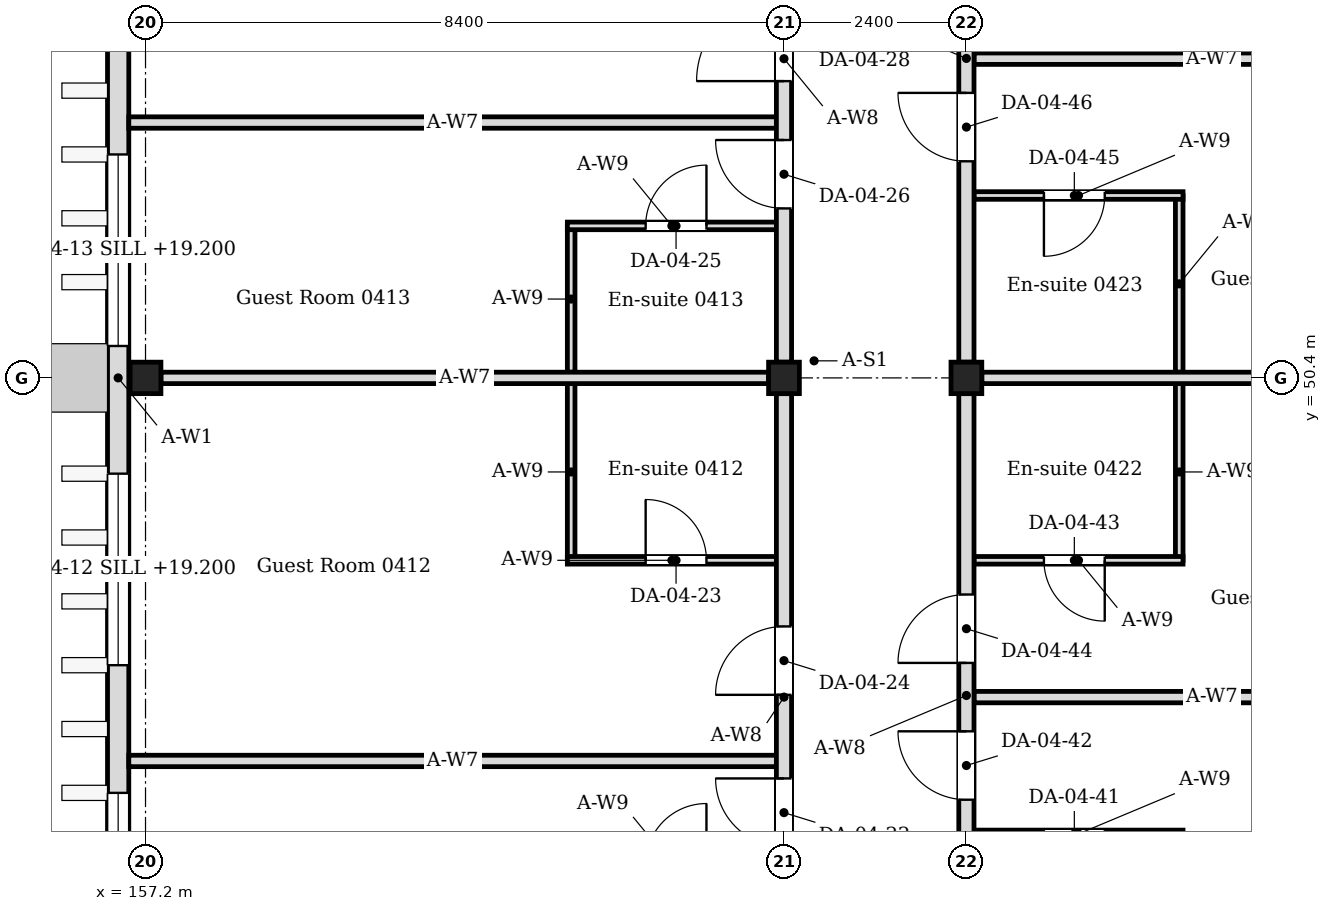
"""IFC4 building model, lengths in metres.
Left out: names, types, materials, properties, quantities, classifications, styles, units other than length and angle.
Written with IfcOpenShell. Run it as: python <this file> out.ifc"""

import sys

from ifc_helpers import new_model, si_unit, direction, frame, frame_2d, origin, origin_2d, place, context, subcontext, project, spatial, rectangle, i_section, extrude, element, fill, save


model = new_model("IFC4")
c1 = context("Model", 3, precision=1e-05, world=origin(), true_north=direction((0.0, 1.0)))
c2 = subcontext(c1, "Body", "Model", "MODEL_VIEW")
j1 = project(units=[si_unit("LENGTHUNIT", "METRE"), si_unit("PLANEANGLEUNIT", "RADIAN")], contexts=[c1])
p1 = place(None, origin())
s1 = spatial("IfcSite", under=j1, at=p1, CompositionType="ELEMENT")
p2 = place(p1, origin())
s2 = spatial("IfcBuilding", under=s1, at=p2, CompositionType="ELEMENT")
p3 = place(p2, frame((0.0, 0.0, 18.6)))
s3 = spatial("IfcBuildingStorey", under=s2, at=p3, CompositionType="ELEMENT", Elevation=18.6)
for number, where, z_axis, x_axis in (
    (1, (157.2, 50.4, 0.0), (0.0, 0.0, 1.0), (1.0, 0.0, 0.0)),
    (2, (165.6, 50.4, 0.0), (0.0, 0.0, 1.0), (1.0, 0.0, 0.0)),
    (3, (168.0, 50.4, 0.0), (0.0, 0.0, 1.0), (1.0, 0.0, 0.0)),
):
    element("IfcColumn", number, at=place(p3, frame(where, z_axis=z_axis, x_axis=x_axis)), inside=s3, PredefinedType="COLUMN", context=c2, shape_type="SweptSolid", body=[
        extrude(i_section(OverallWidth=0.405, OverallDepth=0.414, WebThickness=0.018, FlangeThickness=0.028, FilletRadius=0.022, at=origin_2d()), origin(), (0.0, 0.0, 1.0), 4.2),
    ])
p4 = place(p3, frame((156.84, 41.65, 0.0), z_axis=(0.0, 0.0, 1.0), x_axis=(0.0, 1.0, 0.0)))
e4 = element("IfcWall", 4, at=p4, inside=s3, PredefinedType="SOLIDWALL", context=c2, shape_type="SweptSolid", body=[
    extrude(rectangle(XDim=17.5, YDim=0.28, at=frame_2d((8.75, 0.0))), origin(), (0.0, 0.0, 1.0), 4.05),
])
p5 = place(p4, frame((0.77, 0.0, 0.6)))
e5 = element("IfcOpeningElement", 5, at=p5, cuts=e4, PredefinedType="OPENING", context=c2, shape_type="SweptSolid", body=[
    extrude(rectangle(XDim=2.52, YDim=2.4, at=frame_2d((1.26, 1.2))), frame((0.0, 0.15, 0.0), z_axis=(0.0, -1.0, 0.0), x_axis=(1.0, 0.0, 0.0)), (0.0, 0.0, 1.0), 0.3),
])
p6 = place(p4, frame((4.97, 0.0, 0.6)))
e6 = element("IfcOpeningElement", 6, at=p6, cuts=e4, PredefinedType="OPENING", context=c2, shape_type="SweptSolid", body=[
    extrude(rectangle(XDim=2.52, YDim=2.4, at=frame_2d((1.26, 1.2))), frame((0.0, 0.15, 0.0), z_axis=(0.0, -1.0, 0.0), x_axis=(1.0, 0.0, 0.0)), (0.0, 0.0, 1.0), 0.3),
])
p7 = place(p4, frame((9.17, 0.0, 0.6)))
e7 = element("IfcOpeningElement", 7, at=p7, cuts=e4, PredefinedType="OPENING", context=c2, shape_type="SweptSolid", body=[
    extrude(rectangle(XDim=2.52, YDim=2.4, at=frame_2d((1.26, 1.2))), frame((0.0, 0.15, 0.0), z_axis=(0.0, -1.0, 0.0), x_axis=(1.0, 0.0, 0.0)), (0.0, 0.0, 1.0), 0.3),
])
p8 = place(p4, frame((13.37, 0.0, 0.45)))
e8 = element("IfcOpeningElement", 8, at=p8, cuts=e4, PredefinedType="OPENING", context=c2, shape_type="SweptSolid", body=[
    extrude(rectangle(XDim=2.52, YDim=2.1, at=frame_2d((1.26, 1.05))), frame((0.0, 0.15, 0.0), z_axis=(0.0, -1.0, 0.0), x_axis=(1.0, 0.0, 0.0)), (0.0, 0.0, 1.0), 0.3),
])
p9 = place(p3, frame((162.8, 48.0, 0.0), z_axis=(0.0, 0.0, 1.0), x_axis=(0.0, 1.0, 0.0)))
e9 = element("IfcWall", 9, at=p9, inside=s3, PredefinedType="PARTITIONING", context=c2, shape_type="SweptSolid", body=[
    extrude(rectangle(XDim=2.325, YDim=0.1, at=frame_2d((1.163, 0.0))), origin(), (0.0, 0.0, 1.0), 4.05),
])
p10 = place(p3, frame((162.75, 48.0, 0.0), z_axis=(0.0, 0.0, 1.0), x_axis=(1.0, 0.0, 0.0)))
e10 = element("IfcWall", 10, at=p10, inside=s3, PredefinedType="PARTITIONING", context=c2, shape_type="SweptSolid", body=[
    extrude(rectangle(XDim=2.75, YDim=0.1, at=frame_2d((1.375, 0.0))), origin(), (0.0, 0.0, 1.0), 4.05),
])
p11 = place(p10, frame((1.03, 0.0, 0.0)))
e11 = element("IfcOpeningElement", 11, at=p11, cuts=e10, PredefinedType="OPENING", context=c2, shape_type="SweptSolid", body=[
    extrude(rectangle(XDim=0.8, YDim=2.1, at=frame_2d((0.4, 1.05))), frame((0.0, 0.06, 0.0), z_axis=(0.0, -1.0, 0.0), x_axis=(1.0, 0.0, 0.0)), (0.0, 0.0, 1.0), 0.12),
])
p12 = place(p3, frame((162.8, 50.475, 0.0), z_axis=(0.0, 0.0, 1.0), x_axis=(0.0, 1.0, 0.0)))
e12 = element("IfcWall", 12, at=p12, inside=s3, PredefinedType="PARTITIONING", context=c2, shape_type="SweptSolid", body=[
    extrude(rectangle(XDim=1.925, YDim=0.1, at=frame_2d((0.962, 0.0))), origin(), (0.0, 0.0, 1.0), 4.05),
])
p13 = place(p3, frame((162.75, 52.4, 0.0), z_axis=(0.0, 0.0, 1.0), x_axis=(1.0, 0.0, 0.0)))
e13 = element("IfcWall", 13, at=p13, inside=s3, PredefinedType="PARTITIONING", context=c2, shape_type="SweptSolid", body=[
    extrude(rectangle(XDim=2.75, YDim=0.1, at=frame_2d((1.375, 0.0))), origin(), (0.0, 0.0, 1.0), 4.05),
])
p14 = place(p13, frame((1.03, 0.0, 0.0)))
e14 = element("IfcOpeningElement", 14, at=p14, cuts=e13, PredefinedType="OPENING", context=c2, shape_type="SweptSolid", body=[
    extrude(rectangle(XDim=0.8, YDim=2.1, at=frame_2d((0.4, 1.05))), frame((0.0, 0.06, 0.0), z_axis=(0.0, -1.0, 0.0), x_axis=(1.0, 0.0, 0.0)), (0.0, 0.0, 1.0), 0.12),
])
p15 = place(p3, frame((170.85, 44.4, 0.0), z_axis=(0.0, 0.0, 1.0), x_axis=(-1.0, 0.0, 0.0)))
e15 = element("IfcWall", 15, at=p15, inside=s3, PredefinedType="PARTITIONING", context=c2, shape_type="SweptSolid", body=[
    extrude(rectangle(XDim=2.75, YDim=0.1, at=frame_2d((1.375, 0.0))), origin(), (0.0, 0.0, 1.0), 4.05),
])
p16 = place(p15, frame((1.03, 0.0, 0.0)))
e16 = element("IfcOpeningElement", 16, at=p16, cuts=e15, PredefinedType="OPENING", context=c2, shape_type="SweptSolid", body=[
    extrude(rectangle(XDim=0.8, YDim=2.1, at=frame_2d((0.4, 1.05))), frame((0.0, 0.06, 0.0), z_axis=(0.0, -1.0, 0.0), x_axis=(1.0, 0.0, 0.0)), (0.0, 0.0, 1.0), 0.12),
])
p17 = place(p3, frame((170.8, 48.0, 0.0), z_axis=(0.0, 0.0, 1.0), x_axis=(0.0, 1.0, 0.0)))
e17 = element("IfcWall", 17, at=p17, inside=s3, PredefinedType="PARTITIONING", context=c2, shape_type="SweptSolid", body=[
    extrude(rectangle(XDim=2.325, YDim=0.1, at=frame_2d((1.163, 0.0))), origin(), (0.0, 0.0, 1.0), 4.05),
])
p18 = place(p3, frame((170.85, 48.0, 0.0), z_axis=(0.0, 0.0, 1.0), x_axis=(-1.0, 0.0, 0.0)))
e18 = element("IfcWall", 18, at=p18, inside=s3, PredefinedType="PARTITIONING", context=c2, shape_type="SweptSolid", body=[
    extrude(rectangle(XDim=2.75, YDim=0.1, at=frame_2d((1.375, 0.0))), origin(), (0.0, 0.0, 1.0), 4.05),
])
p19 = place(p18, frame((1.03, 0.0, 0.0)))
e19 = element("IfcOpeningElement", 19, at=p19, cuts=e18, PredefinedType="OPENING", context=c2, shape_type="SweptSolid", body=[
    extrude(rectangle(XDim=0.8, YDim=2.1, at=frame_2d((0.4, 1.05))), frame((0.0, 0.06, 0.0), z_axis=(0.0, -1.0, 0.0), x_axis=(1.0, 0.0, 0.0)), (0.0, 0.0, 1.0), 0.12),
])
p20 = place(p3, frame((170.8, 50.475, 0.0), z_axis=(0.0, 0.0, 1.0), x_axis=(0.0, 1.0, 0.0)))
e20 = element("IfcWall", 20, at=p20, inside=s3, PredefinedType="PARTITIONING", context=c2, shape_type="SweptSolid", body=[
    extrude(rectangle(XDim=2.325, YDim=0.1, at=frame_2d((1.163, 0.0))), origin(), (0.0, 0.0, 1.0), 4.05),
])
p21 = place(p3, frame((170.85, 52.8, 0.0), z_axis=(0.0, 0.0, 1.0), x_axis=(-1.0, 0.0, 0.0)))
e21 = element("IfcWall", 21, at=p21, inside=s3, PredefinedType="PARTITIONING", context=c2, shape_type="SweptSolid", body=[
    extrude(rectangle(XDim=2.75, YDim=0.1, at=frame_2d((1.375, 0.0))), origin(), (0.0, 0.0, 1.0), 4.05),
])
p22 = place(p21, frame((1.03, 0.0, 0.0)))
e22 = element("IfcOpeningElement", 22, at=p22, cuts=e21, PredefinedType="OPENING", context=c2, shape_type="SweptSolid", body=[
    extrude(rectangle(XDim=0.8, YDim=2.1, at=frame_2d((0.4, 1.05))), frame((0.0, 0.06, 0.0), z_axis=(0.0, -1.0, 0.0), x_axis=(1.0, 0.0, 0.0)), (0.0, 0.0, 1.0), 0.12),
])
p23 = place(p3, frame((157.403, 50.4, 0.0), z_axis=(0.0, 0.0, 1.0), x_axis=(1.0, 0.0, 0.0)))
e23 = element("IfcWall", 23, at=p23, inside=s3, PredefinedType="PARTITIONING", context=c2, shape_type="SweptSolid", body=[
    extrude(rectangle(XDim=7.995, YDim=0.15, at=frame_2d((3.998, 0.0))), origin(), (0.0, 0.0, 1.0), 3.604),
])
p24 = place(p3, frame((168.202, 50.4, 0.0), z_axis=(0.0, 0.0, 1.0), x_axis=(1.0, 0.0, 0.0)))
e24 = element("IfcWall", 24, at=p24, inside=s3, PredefinedType="PARTITIONING", context=c2, shape_type="SweptSolid", body=[
    extrude(rectangle(XDim=7.995, YDim=0.15, at=frame_2d((3.998, 0.0))), origin(), (0.0, 0.0, 1.0), 3.604),
])
for number, where, z_axis, x_axis in (
    (25, (156.98, 45.36, 0.0), (0.0, 0.0, 1.0), (1.0, 0.0, 0.0)),
    (26, (156.98, 53.76, 0.0), (0.0, 0.0, 1.0), (1.0, 0.0, 0.0)),
):
    element("IfcWall", number, at=place(p3, frame(where, z_axis=z_axis, x_axis=x_axis)), inside=s3, PredefinedType="PARTITIONING", context=c2, shape_type="SweptSolid", body=[
        extrude(rectangle(XDim=8.52, YDim=0.15, at=frame_2d((4.26, 0.0))), origin(), (0.0, 0.0, 1.0), 3.604),
    ])
for number, where, z_axis, x_axis in (
    (27, (168.1, 46.2, 0.0), (0.0, 0.0, 1.0), (1.0, 0.0, 0.0)),
    (28, (168.1, 54.6, 0.0), (0.0, 0.0, 1.0), (1.0, 0.0, 0.0)),
):
    element("IfcWall", number, at=place(p3, frame(where, z_axis=z_axis, x_axis=x_axis)), inside=s3, PredefinedType="PARTITIONING", context=c2, shape_type="SweptSolid", body=[
        extrude(rectangle(XDim=6.26, YDim=0.15, at=frame_2d((3.13, 0.0))), origin(), (0.0, 0.0, 1.0), 3.604),
    ])
p25 = place(p3, frame((165.6, 42.207, 0.0), z_axis=(0.0, 0.0, 1.0), x_axis=(0.0, 1.0, 0.0)))
e29 = element("IfcWall", 29, at=p25, inside=s3, PredefinedType="PARTITIONING", context=c2, shape_type="SweptSolid", body=[
    extrude(rectangle(XDim=7.986, YDim=0.2, at=frame_2d((3.993, 0.0))), origin(), (0.0, 0.0, 1.0), 3.45),
])
p26 = place(p25, frame((2.023, 0.0, 0.0)))
e30 = element("IfcOpeningElement", 30, at=p26, cuts=e29, PredefinedType="OPENING", context=c2, shape_type="SweptSolid", body=[
    extrude(rectangle(XDim=0.9, YDim=2.1, at=frame_2d((0.45, 1.05))), frame((0.0, 0.11, 0.0), z_axis=(0.0, -1.0, 0.0), x_axis=(1.0, 0.0, 0.0)), (0.0, 0.0, 1.0), 0.22),
])
p27 = place(p25, frame((4.023, 0.0, 0.0)))
e31 = element("IfcOpeningElement", 31, at=p27, cuts=e29, PredefinedType="OPENING", context=c2, shape_type="SweptSolid", body=[
    extrude(rectangle(XDim=0.9, YDim=2.1, at=frame_2d((0.45, 1.05))), frame((0.0, 0.11, 0.0), z_axis=(0.0, -1.0, 0.0), x_axis=(1.0, 0.0, 0.0)), (0.0, 0.0, 1.0), 0.22),
])
p28 = place(p3, frame((165.6, 50.607, 0.0), z_axis=(0.0, 0.0, 1.0), x_axis=(0.0, 1.0, 0.0)))
e32 = element("IfcWall", 32, at=p28, inside=s3, PredefinedType="PARTITIONING", context=c2, shape_type="SweptSolid", body=[
    extrude(rectangle(XDim=7.986, YDim=0.2, at=frame_2d((3.993, 0.0))), origin(), (0.0, 0.0, 1.0), 3.45),
])
p29 = place(p28, frame((2.023, 0.0, 0.0)))
e33 = element("IfcOpeningElement", 33, at=p29, cuts=e32, PredefinedType="OPENING", context=c2, shape_type="SweptSolid", body=[
    extrude(rectangle(XDim=0.9, YDim=2.1, at=frame_2d((0.45, 1.05))), frame((0.0, 0.11, 0.0), z_axis=(0.0, -1.0, 0.0), x_axis=(1.0, 0.0, 0.0)), (0.0, 0.0, 1.0), 0.22),
])
p30 = place(p28, frame((3.698, 0.0, 0.0)))
e34 = element("IfcOpeningElement", 34, at=p30, cuts=e32, PredefinedType="OPENING", context=c2, shape_type="SweptSolid", body=[
    extrude(rectangle(XDim=1.15, YDim=2.1, at=frame_2d((0.575, 1.05))), frame((0.0, 0.11, 0.0), z_axis=(0.0, -1.0, 0.0), x_axis=(1.0, 0.0, 0.0)), (0.0, 0.0, 1.0), 0.22),
])
p31 = place(p3, frame((168.0, 42.25, 0.0), z_axis=(0.0, 0.0, 1.0), x_axis=(0.0, 1.0, 0.0)))
e35 = element("IfcWall", 35, at=p31, inside=s3, PredefinedType="PARTITIONING", context=c2, shape_type="SweptSolid", body=[
    extrude(rectangle(XDim=7.943, YDim=0.2, at=frame_2d((3.972, 0.0))), origin(), (0.0, 0.0, 1.0), 3.45),
])
p32 = place(p31, frame((2.6, 0.0, 0.0)))
e36 = element("IfcOpeningElement", 36, at=p32, cuts=e35, PredefinedType="OPENING", context=c2, shape_type="SweptSolid", body=[
    extrude(rectangle(XDim=0.9, YDim=2.1, at=frame_2d((0.45, 1.05))), frame((0.0, 0.11, 0.0), z_axis=(0.0, -1.0, 0.0), x_axis=(1.0, 0.0, 0.0)), (0.0, 0.0, 1.0), 0.22),
])
p33 = place(p31, frame((4.4, 0.0, 0.0)))
e37 = element("IfcOpeningElement", 37, at=p33, cuts=e35, PredefinedType="OPENING", context=c2, shape_type="SweptSolid", body=[
    extrude(rectangle(XDim=0.9, YDim=2.1, at=frame_2d((0.45, 1.05))), frame((0.0, 0.11, 0.0), z_axis=(0.0, -1.0, 0.0), x_axis=(1.0, 0.0, 0.0)), (0.0, 0.0, 1.0), 0.22),
])
p34 = place(p3, frame((168.0, 50.607, 0.0), z_axis=(0.0, 0.0, 1.0), x_axis=(0.0, 1.0, 0.0)))
e38 = element("IfcWall", 38, at=p34, inside=s3, PredefinedType="PARTITIONING", context=c2, shape_type="SweptSolid", body=[
    extrude(rectangle(XDim=7.993, YDim=0.2, at=frame_2d((3.997, 0.0))), origin(), (0.0, 0.0, 1.0), 3.45),
])
p35 = place(p34, frame((2.643, 0.0, 0.0)))
e39 = element("IfcOpeningElement", 39, at=p35, cuts=e38, PredefinedType="OPENING", context=c2, shape_type="SweptSolid", body=[
    extrude(rectangle(XDim=0.9, YDim=2.1, at=frame_2d((0.45, 1.05))), frame((0.0, 0.11, 0.0), z_axis=(0.0, -1.0, 0.0), x_axis=(1.0, 0.0, 0.0)), (0.0, 0.0, 1.0), 0.22),
])
p36 = place(p34, frame((4.443, 0.0, 0.0)))
e40 = element("IfcOpeningElement", 40, at=p36, cuts=e38, PredefinedType="OPENING", context=c2, shape_type="SweptSolid", body=[
    extrude(rectangle(XDim=0.9, YDim=2.1, at=frame_2d((0.45, 1.05))), frame((0.0, 0.11, 0.0), z_axis=(0.0, -1.0, 0.0), x_axis=(1.0, 0.0, 0.0)), (0.0, 0.0, 1.0), 0.22),
])
p37 = place(p5, origin())
e41 = element("IfcWindow", 41, at=p37, inside=s3, PartitioningType="SINGLE_PANEL", PredefinedType="WINDOW", context=c2, shape_type="SweptSolid", body=[
    extrude(rectangle(XDim=2.52, YDim=2.4, at=frame_2d((1.26, 1.2))), frame((0.0, 0.03, 0.0), z_axis=(0.0, -1.0, 0.0), x_axis=(1.0, 0.0, 0.0)), (0.0, 0.0, 1.0), 0.06),
])
fill(e5, e41)
p38 = place(p6, origin())
e42 = element("IfcWindow", 42, at=p38, inside=s3, PartitioningType="SINGLE_PANEL", PredefinedType="WINDOW", context=c2, shape_type="SweptSolid", body=[
    extrude(rectangle(XDim=2.52, YDim=2.4, at=frame_2d((1.26, 1.2))), frame((0.0, 0.03, 0.0), z_axis=(0.0, -1.0, 0.0), x_axis=(1.0, 0.0, 0.0)), (0.0, 0.0, 1.0), 0.06),
])
fill(e6, e42)
p39 = place(p7, origin())
e43 = element("IfcWindow", 43, at=p39, inside=s3, PartitioningType="SINGLE_PANEL", PredefinedType="WINDOW", context=c2, shape_type="SweptSolid", body=[
    extrude(rectangle(XDim=2.52, YDim=2.4, at=frame_2d((1.26, 1.2))), frame((0.0, 0.03, 0.0), z_axis=(0.0, -1.0, 0.0), x_axis=(1.0, 0.0, 0.0)), (0.0, 0.0, 1.0), 0.06),
])
fill(e7, e43)
p40 = place(p26, origin())
e44 = element("IfcDoor", 44, at=p40, inside=s3, OperationType="SINGLE_SWING_RIGHT", PredefinedType="DOOR", context=c2, shape_type="SweptSolid", body=[
    extrude(rectangle(XDim=0.9, YDim=2.1, at=frame_2d((0.45, 1.05))), frame((0.0, 0.025, 0.0), z_axis=(0.0, -1.0, 0.0), x_axis=(1.0, 0.0, 0.0)), (0.0, 0.0, 1.0), 0.05),
])
fill(e30, e44)
p41 = place(p11, origin())
e45 = element("IfcDoor", 45, at=p41, inside=s3, OperationType="SINGLE_SWING_LEFT", PredefinedType="DOOR", context=c2, shape_type="SweptSolid", body=[
    extrude(rectangle(XDim=0.8, YDim=2.1, at=frame_2d((0.4, 1.05))), frame((0.0, 0.025, 0.0), z_axis=(0.0, -1.0, 0.0), x_axis=(1.0, 0.0, 0.0)), (0.0, 0.0, 1.0), 0.05),
])
fill(e11, e45)
p42 = place(p27, origin())
e46 = element("IfcDoor", 46, at=p42, inside=s3, OperationType="SINGLE_SWING_LEFT", PredefinedType="DOOR", context=c2, shape_type="SweptSolid", body=[
    extrude(rectangle(XDim=0.9, YDim=2.1, at=frame_2d((0.45, 1.05))), frame((0.0, 0.025, 0.0), z_axis=(0.0, -1.0, 0.0), x_axis=(1.0, 0.0, 0.0)), (0.0, 0.0, 1.0), 0.05),
])
fill(e31, e46)
p43 = place(p14, origin())
e47 = element("IfcDoor", 47, at=p43, inside=s3, OperationType="SINGLE_SWING_RIGHT", PredefinedType="DOOR", context=c2, shape_type="SweptSolid", body=[
    extrude(rectangle(XDim=0.8, YDim=2.1, at=frame_2d((0.4, 1.05))), frame((0.0, 0.025, 0.0), z_axis=(0.0, -1.0, 0.0), x_axis=(1.0, 0.0, 0.0)), (0.0, 0.0, 1.0), 0.05),
])
fill(e14, e47)
p44 = place(p29, origin())
e48 = element("IfcDoor", 48, at=p44, inside=s3, OperationType="SINGLE_SWING_RIGHT", PredefinedType="DOOR", context=c2, shape_type="SweptSolid", body=[
    extrude(rectangle(XDim=0.9, YDim=2.1, at=frame_2d((0.45, 1.05))), frame((0.0, 0.025, 0.0), z_axis=(0.0, -1.0, 0.0), x_axis=(1.0, 0.0, 0.0)), (0.0, 0.0, 1.0), 0.05),
])
fill(e33, e48)
p45 = place(p30, origin())
e49 = element("IfcDoor", 49, at=p45, inside=s3, OperationType="SINGLE_SWING_LEFT", PredefinedType="DOOR", context=c2, shape_type="SweptSolid", body=[
    extrude(rectangle(XDim=1.15, YDim=2.1, at=frame_2d((0.575, 1.05))), frame((0.0, 0.025, 0.0), z_axis=(0.0, -1.0, 0.0), x_axis=(1.0, 0.0, 0.0)), (0.0, 0.0, 1.0), 0.05),
])
fill(e34, e49)
p46 = place(p32, origin())
e50 = element("IfcDoor", 50, at=p46, inside=s3, OperationType="SINGLE_SWING_RIGHT", PredefinedType="DOOR", context=c2, shape_type="SweptSolid", body=[
    extrude(rectangle(XDim=0.9, YDim=2.1, at=frame_2d((0.45, 1.05))), frame((0.0, 0.025, 0.0), z_axis=(0.0, -1.0, 0.0), x_axis=(1.0, 0.0, 0.0)), (0.0, 0.0, 1.0), 0.05),
])
fill(e36, e50)
p47 = place(p19, origin())
e51 = element("IfcDoor", 51, at=p47, inside=s3, OperationType="SINGLE_SWING_LEFT", PredefinedType="DOOR", context=c2, shape_type="SweptSolid", body=[
    extrude(rectangle(XDim=0.8, YDim=2.1, at=frame_2d((0.4, 1.05))), frame((0.0, 0.025, 0.0), z_axis=(0.0, -1.0, 0.0), x_axis=(1.0, 0.0, 0.0)), (0.0, 0.0, 1.0), 0.05),
])
fill(e19, e51)
p48 = place(p33, origin())
e52 = element("IfcDoor", 52, at=p48, inside=s3, OperationType="SINGLE_SWING_LEFT", PredefinedType="DOOR", context=c2, shape_type="SweptSolid", body=[
    extrude(rectangle(XDim=0.9, YDim=2.1, at=frame_2d((0.45, 1.05))), frame((0.0, 0.025, 0.0), z_axis=(0.0, -1.0, 0.0), x_axis=(1.0, 0.0, 0.0)), (0.0, 0.0, 1.0), 0.05),
])
fill(e37, e52)
p49 = place(p22, origin())
e53 = element("IfcDoor", 53, at=p49, inside=s3, OperationType="SINGLE_SWING_RIGHT", PredefinedType="DOOR", context=c2, shape_type="SweptSolid", body=[
    extrude(rectangle(XDim=0.8, YDim=2.1, at=frame_2d((0.4, 1.05))), frame((0.0, 0.025, 0.0), z_axis=(0.0, -1.0, 0.0), x_axis=(1.0, 0.0, 0.0)), (0.0, 0.0, 1.0), 0.05),
])
fill(e22, e53)
p50 = place(p35, origin())
e54 = element("IfcDoor", 54, at=p50, inside=s3, OperationType="SINGLE_SWING_RIGHT", PredefinedType="DOOR", context=c2, shape_type="SweptSolid", body=[
    extrude(rectangle(XDim=0.9, YDim=2.1, at=frame_2d((0.45, 1.05))), frame((0.0, 0.025, 0.0), z_axis=(0.0, -1.0, 0.0), x_axis=(1.0, 0.0, 0.0)), (0.0, 0.0, 1.0), 0.05),
])
fill(e39, e54)
save(model, sys.argv[1])
